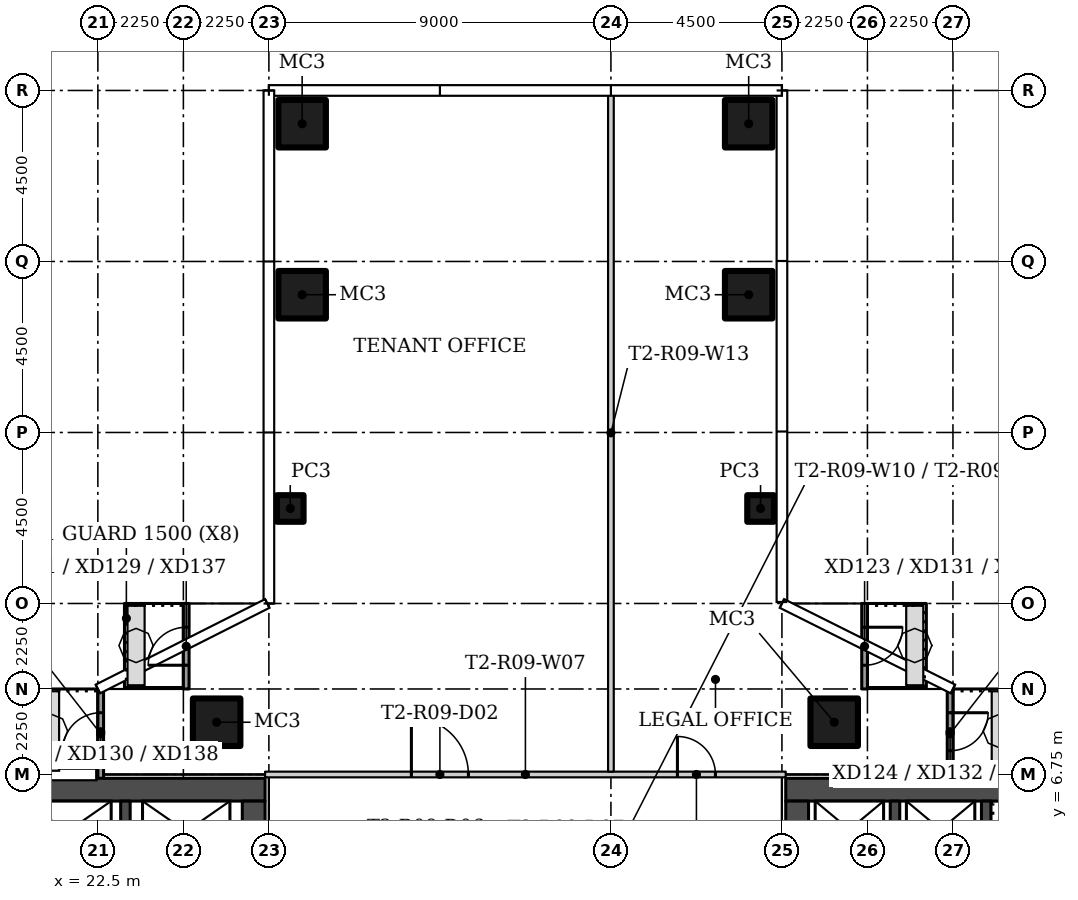
"""IFC4 building model, lengths in metres.
Left out: names, types, materials, properties, quantities, classifications, styles, units other than length and angle.
Written with IfcOpenShell. Run it as: python <this file> out.ifc"""

import sys

from ifc_helpers import new_model, si_unit, direction, frame, frame_2d, origin, origin_2d, place, context, subcontext, project, spatial, rectangle, hollow_rectangle, extrude, element, fill, save


model = new_model("IFC4")
c1 = context("Model", 3, precision=1e-05, world=origin(), true_north=direction((0.0, 1.0)))
c2 = subcontext(c1, "Body", "Model", "MODEL_VIEW")
j1 = project(units=[si_unit("LENGTHUNIT", "METRE"), si_unit("PLANEANGLEUNIT", "RADIAN")], contexts=[c1])
p1 = place(None, origin())
s1 = spatial("IfcSite", under=j1, at=p1, CompositionType="ELEMENT")
p2 = place(p1, origin())
s2 = spatial("IfcBuilding", under=s1, at=p2, CompositionType="ELEMENT")
p3 = place(p2, frame((0.0, 0.0, 89.7)))
s3 = spatial("IfcBuildingStorey", under=s2, at=p3, CompositionType="ELEMENT", Elevation=89.7)
for number, where in (
    (1, (25.625, 8.125, 0.0)),
    (2, (41.875, 8.125, 0.0)),
):
    element("IfcColumn", number, at=place(p3, frame(where)), inside=s3, PredefinedType="COLUMN", context=c2, shape_type="SweptSolid", body=[
        extrude(hollow_rectangle(XDim=1.25, YDim=1.25, WallThickness=0.05, at=origin_2d()), origin(), (0.0, 0.0, 1.0), 3.55),
    ])
p4 = place(p3, frame((39.938, 13.75, 0.0)))
e3 = element("IfcColumn", 3, at=p4, inside=s3, PredefinedType="COLUMN", context=c2, shape_type="SweptSolid", body=[
    extrude(hollow_rectangle(XDim=0.7, YDim=0.7, WallThickness=0.025, at=origin_2d()), origin(), (0.0, 0.0, 1.0), 3.55),
])
for number, where in (
    (4, (39.625, 19.375, 0.0)),
    (5, (39.625, 23.875, 0.0)),
):
    element("IfcColumn", number, at=place(p3, frame(where)), inside=s3, PredefinedType="COLUMN", context=c2, shape_type="SweptSolid", body=[
        extrude(hollow_rectangle(XDim=1.25, YDim=1.25, WallThickness=0.05, at=origin_2d()), origin(), (0.0, 0.0, 1.0), 3.55),
    ])
p5 = place(p3, frame((27.562, 13.75, 0.0)))
e6 = element("IfcColumn", 6, at=p5, inside=s3, PredefinedType="COLUMN", context=c2, shape_type="SweptSolid", body=[
    extrude(hollow_rectangle(XDim=0.7, YDim=0.7, WallThickness=0.025, at=origin_2d()), origin(), (0.0, 0.0, 1.0), 3.55),
])
for number, where in (
    (7, (27.875, 19.375, 0.0)),
    (8, (27.875, 23.875, 0.0)),
):
    element("IfcColumn", number, at=place(p3, frame(where)), inside=s3, PredefinedType="COLUMN", context=c2, shape_type="SweptSolid", body=[
        extrude(hollow_rectangle(XDim=1.25, YDim=1.25, WallThickness=0.05, at=origin_2d()), origin(), (0.0, 0.0, 1.0), 3.55),
    ])
p6 = place(p3, frame((26.9, 6.75, 0.0)))
e9 = element("IfcWall", 9, at=p6, inside=s3, PredefinedType="PARTITIONING", context=c2, shape_type="SweptSolid", body=[
    extrude(rectangle(XDim=13.7, YDim=0.15, at=frame_2d((6.85, 0.0))), origin(), (0.0, 0.0, 1.0), 3.55),
])
p7 = place(p6, frame((10.85, 0.0, 0.0)))
e10 = element("IfcOpeningElement", 10, at=p7, cuts=e9, PredefinedType="OPENING", context=c2, shape_type="SweptSolid", body=[
    extrude(rectangle(XDim=1.0, YDim=2.4, at=frame_2d((0.5, 1.2))), frame((0.0, 0.085, 0.0), z_axis=(0.0, -1.0, 0.0), x_axis=(1.0, 0.0, 0.0)), (0.0, 0.0, 1.0), 0.17),
])
p8 = place(p6, frame((3.85, 0.0, 0.0)))
e11 = element("IfcOpeningElement", 11, at=p8, cuts=e9, PredefinedType="OPENING", context=c2, shape_type="SweptSolid", body=[
    extrude(rectangle(XDim=1.5, YDim=2.1, at=frame_2d((0.75, 1.05))), frame((0.0, 0.085, 0.0), z_axis=(0.0, -1.0, 0.0), x_axis=(1.0, 0.0, 0.0)), (0.0, 0.0, 1.0), 0.17),
])
p9 = place(p3, frame((36.0, 24.655, 0.0), z_axis=(0.0, 0.0, 1.0), x_axis=(0.0, -1.0, 0.0)))
e12 = element("IfcWall", 12, at=p9, inside=s3, PredefinedType="PARTITIONING", context=c2, shape_type="SweptSolid", body=[
    extrude(rectangle(XDim=17.83, YDim=0.15, at=frame_2d((8.915, 0.0))), origin(), (0.0, 0.0, 1.0), 3.55),
])
p10 = place(p3, frame((24.825, 9.0, 0.0), z_axis=(0.0, 0.0, 1.0), x_axis=(0.0, 1.0, 0.0)))
e13 = element("IfcWall", 13, at=p10, inside=s3, PredefinedType="SOLIDWALL", context=c2, shape_type="SweptSolid", body=[
    extrude(rectangle(XDim=2.25, YDim=0.15, at=frame_2d((1.125, 0.0))), origin(), (0.0, 0.0, 1.0), 3.45),
])
p11 = place(p10, frame((0.625, 0.0, 0.0)))
e14 = element("IfcOpeningElement", 14, at=p11, cuts=e13, PredefinedType="OPENING", context=c2, shape_type="SweptSolid", body=[
    extrude(rectangle(XDim=1.0, YDim=2.4, at=frame_2d((0.5, 1.2))), frame((0.0, 0.085, 0.0), z_axis=(0.0, -1.0, 0.0), x_axis=(1.0, 0.0, 0.0)), (0.0, 0.0, 1.0), 0.17),
])
p12 = place(p3, frame((22.575, 6.643, 0.0), z_axis=(0.0, 0.0, 1.0), x_axis=(0.0, 1.0, 0.0)))
e15 = element("IfcWall", 15, at=p12, inside=s3, PredefinedType="SOLIDWALL", context=c2, shape_type="SweptSolid", body=[
    extrude(rectangle(XDim=2.357, YDim=0.15, at=frame_2d((1.178, 0.0))), origin(), (0.0, 0.0, 1.0), 3.45),
])
p13 = place(p12, frame((0.732, 0.0, 0.0)))
e16 = element("IfcOpeningElement", 16, at=p13, cuts=e15, PredefinedType="OPENING", context=c2, shape_type="SweptSolid", body=[
    extrude(rectangle(XDim=1.0, YDim=2.4, at=frame_2d((0.5, 1.2))), frame((0.0, 0.085, 0.0), z_axis=(0.0, -1.0, 0.0), x_axis=(1.0, 0.0, 0.0)), (0.0, 0.0, 1.0), 0.17),
])
p14 = place(p3, frame((42.675, 11.25, 0.0), z_axis=(0.0, 0.0, 1.0), x_axis=(0.0, -1.0, 0.0)))
e17 = element("IfcWall", 17, at=p14, inside=s3, PredefinedType="SOLIDWALL", context=c2, shape_type="SweptSolid", body=[
    extrude(rectangle(XDim=2.25, YDim=0.15, at=frame_2d((1.125, 0.0))), origin(), (0.0, 0.0, 1.0), 3.45),
])
p15 = place(p14, frame((0.625, 0.0, 0.0)))
e18 = element("IfcOpeningElement", 18, at=p15, cuts=e17, PredefinedType="OPENING", context=c2, shape_type="SweptSolid", body=[
    extrude(rectangle(XDim=1.0, YDim=2.4, at=frame_2d((0.5, 1.2))), frame((0.0, 0.085, 0.0), z_axis=(0.0, -1.0, 0.0), x_axis=(1.0, 0.0, 0.0)), (0.0, 0.0, 1.0), 0.17),
])
p16 = place(p3, frame((44.925, 9.0, 0.0), z_axis=(0.0, 0.0, 1.0), x_axis=(0.0, -1.0, 0.0)))
e19 = element("IfcWall", 19, at=p16, inside=s3, PredefinedType="SOLIDWALL", context=c2, shape_type="SweptSolid", body=[
    extrude(rectangle(XDim=2.357, YDim=0.15, at=frame_2d((1.178, 0.0))), origin(), (0.0, 0.0, 1.0), 3.45),
])
p17 = place(p16, frame((0.625, 0.0, 0.0)))
e20 = element("IfcOpeningElement", 20, at=p17, cuts=e19, PredefinedType="OPENING", context=c2, shape_type="SweptSolid", body=[
    extrude(rectangle(XDim=1.0, YDim=2.4, at=frame_2d((0.5, 1.2))), frame((0.0, 0.085, 0.0), z_axis=(0.0, -1.0, 0.0), x_axis=(1.0, 0.0, 0.0)), (0.0, 0.0, 1.0), 0.17),
])
p18 = place(p3, frame((13.6, 6.35, 0.0)))
e21 = element("IfcWall", 21, at=p18, inside=s3, PredefinedType="SHEAR", context=c2, shape_type="SweptSolid", body=[
    extrude(rectangle(XDim=13.3, YDim=0.6, at=frame_2d((6.65, 0.0))), origin(), (0.0, 0.0, 1.0), 3.55),
])
p19 = place(p3, frame((26.6, 6.05, 0.0), z_axis=(0.0, 0.0, 1.0), x_axis=(0.0, -1.0, 0.0)))
e22 = element("IfcWall", 22, at=p19, inside=s3, PredefinedType="SHEAR", context=c2, shape_type="SweptSolid", body=[
    extrude(rectangle(XDim=12.1, YDim=0.6, at=frame_2d((6.05, 0.0))), origin(), (0.0, 0.0, 1.0), 3.55),
])
p20 = place(p19, frame((10.1, 0.0, 0.0)))
e23 = element("IfcOpeningElement", 23, at=p20, cuts=e22, PredefinedType="OPENING", context=c2, shape_type="SweptSolid", body=[
    extrude(rectangle(XDim=1.2, YDim=2.1, at=frame_2d((0.6, 1.05))), frame((0.0, 0.31, 0.0), z_axis=(0.0, -1.0, 0.0), x_axis=(1.0, 0.0, 0.0)), (0.0, 0.0, 1.0), 0.62),
])
p21 = place(p19, frame((3.9, 0.0, 0.0)))
e24 = element("IfcOpeningElement", 24, at=p21, cuts=e22, PredefinedType="OPENING", context=c2, shape_type="SweptSolid", body=[
    extrude(rectangle(XDim=1.8, YDim=2.4, at=frame_2d((0.9, 1.2))), frame((0.0, 0.31, 0.0), z_axis=(0.0, -1.0, 0.0), x_axis=(1.0, 0.0, 0.0)), (0.0, 0.0, 1.0), 0.62),
])
p22 = place(p3, frame((23.225, 3.25, 0.0), z_axis=(0.0, 0.0, 1.0), x_axis=(0.0, 1.0, 0.0)))
e25 = element("IfcWall", 25, at=p22, inside=s3, PredefinedType="SHEAR", context=c2, shape_type="SweptSolid", body=[
    extrude(rectangle(XDim=2.8, YDim=0.25, at=frame_2d((1.4, 0.0))), origin(), (0.0, 0.0, 1.0), 3.55),
])
p23 = place(p3, frame((53.9, 6.35, 0.0), z_axis=(0.0, 0.0, 1.0), x_axis=(-1.0, 0.0, 0.0)))
e26 = element("IfcWall", 26, at=p23, inside=s3, PredefinedType="SHEAR", context=c2, shape_type="SweptSolid", body=[
    extrude(rectangle(XDim=13.3, YDim=0.6, at=frame_2d((6.65, 0.0))), origin(), (0.0, 0.0, 1.0), 3.55),
])
p24 = place(p3, frame((40.9, -6.05, 0.0), z_axis=(0.0, 0.0, 1.0), x_axis=(0.0, 1.0, 0.0)))
e27 = element("IfcWall", 27, at=p24, inside=s3, PredefinedType="SHEAR", context=c2, shape_type="SweptSolid", body=[
    extrude(rectangle(XDim=12.1, YDim=0.6, at=frame_2d((6.05, 0.0))), origin(), (0.0, 0.0, 1.0), 3.55),
])
p25 = place(p24, frame((0.8, 0.0, 0.0)))
e28 = element("IfcOpeningElement", 28, at=p25, cuts=e27, PredefinedType="OPENING", context=c2, shape_type="SweptSolid", body=[
    extrude(rectangle(XDim=1.2, YDim=2.1, at=frame_2d((0.6, 1.05))), frame((0.0, 0.31, 0.0), z_axis=(0.0, -1.0, 0.0), x_axis=(1.0, 0.0, 0.0)), (0.0, 0.0, 1.0), 0.62),
])
p26 = place(p24, frame((6.4, 0.0, 0.0)))
e29 = element("IfcOpeningElement", 29, at=p26, cuts=e27, PredefinedType="OPENING", context=c2, shape_type="SweptSolid", body=[
    extrude(rectangle(XDim=1.8, YDim=2.4, at=frame_2d((0.9, 1.2))), frame((0.0, 0.31, 0.0), z_axis=(0.0, -1.0, 0.0), x_axis=(1.0, 0.0, 0.0)), (0.0, 0.0, 1.0), 0.62),
])
for number, where, z_axis, x_axis in (
    (30, (45.875, 3.25, 0.0), (0.0, 0.0, 1.0), (0.0, 1.0, 0.0)),
    (31, (43.475, 3.25, 0.0), (0.0, 0.0, 1.0), (0.0, 1.0, 0.0)),
):
    element("IfcWall", number, at=place(p3, frame(where, z_axis=z_axis, x_axis=x_axis)), inside=s3, PredefinedType="SHEAR", context=c2, shape_type="SweptSolid", body=[
        extrude(rectangle(XDim=2.8, YDim=0.25, at=frame_2d((1.4, 0.0))), origin(), (0.0, 0.0, 1.0), 3.55),
    ])
p27 = place(p7, origin())
e32 = element("IfcDoor", 32, at=p27, inside=s3, OperationType="SINGLE_SWING_LEFT", PredefinedType="DOOR", context=c2, shape_type="SweptSolid", body=[
    extrude(rectangle(XDim=1.0, YDim=2.4, at=frame_2d((0.5, 1.2))), frame((0.0, 0.025, 0.0), z_axis=(0.0, -1.0, 0.0), x_axis=(1.0, 0.0, 0.0)), (0.0, 0.0, 1.0), 0.05),
])
fill(e10, e32)
p28 = place(p8, origin())
e33 = element("IfcDoor", 33, at=p28, inside=s3, OperationType="DOUBLE_DOOR_SINGLE_SWING", PredefinedType="DOOR", context=c2, shape_type="SweptSolid", body=[
    extrude(rectangle(XDim=1.5, YDim=2.1, at=frame_2d((0.75, 1.05))), frame((0.0, 0.025, 0.0), z_axis=(0.0, -1.0, 0.0), x_axis=(1.0, 0.0, 0.0)), (0.0, 0.0, 1.0), 0.05),
])
fill(e11, e33)
p29 = place(p11, origin())
e34 = element("IfcDoor", 34, at=p29, inside=s3, OperationType="SINGLE_SWING_RIGHT", PredefinedType="DOOR", context=c2, shape_type="SweptSolid", body=[
    extrude(rectangle(XDim=1.0, YDim=2.4, at=frame_2d((0.5, 1.2))), frame((0.0, 0.025, 0.0), z_axis=(0.0, -1.0, 0.0), x_axis=(1.0, 0.0, 0.0)), (0.0, 0.0, 1.0), 0.05),
])
fill(e14, e34)
p30 = place(p13, origin())
e35 = element("IfcDoor", 35, at=p30, inside=s3, OperationType="SINGLE_SWING_LEFT", PredefinedType="DOOR", context=c2, shape_type="SweptSolid", body=[
    extrude(rectangle(XDim=1.0, YDim=2.4, at=frame_2d((0.5, 1.2))), frame((0.0, 0.025, 0.0), z_axis=(0.0, -1.0, 0.0), x_axis=(1.0, 0.0, 0.0)), (0.0, 0.0, 1.0), 0.05),
])
fill(e16, e35)
p31 = place(p15, origin())
e36 = element("IfcDoor", 36, at=p31, inside=s3, OperationType="SINGLE_SWING_RIGHT", PredefinedType="DOOR", context=c2, shape_type="SweptSolid", body=[
    extrude(rectangle(XDim=1.0, YDim=2.4, at=frame_2d((0.5, 1.2))), frame((0.0, 0.025, 0.0), z_axis=(0.0, -1.0, 0.0), x_axis=(1.0, 0.0, 0.0)), (0.0, 0.0, 1.0), 0.05),
])
fill(e18, e36)
p32 = place(p17, origin())
e37 = element("IfcDoor", 37, at=p32, inside=s3, OperationType="SINGLE_SWING_LEFT", PredefinedType="DOOR", context=c2, shape_type="SweptSolid", body=[
    extrude(rectangle(XDim=1.0, YDim=2.4, at=frame_2d((0.5, 1.2))), frame((0.0, 0.025, 0.0), z_axis=(0.0, -1.0, 0.0), x_axis=(1.0, 0.0, 0.0)), (0.0, 0.0, 1.0), 0.05),
])
fill(e20, e37)
save(model, sys.argv[1])
